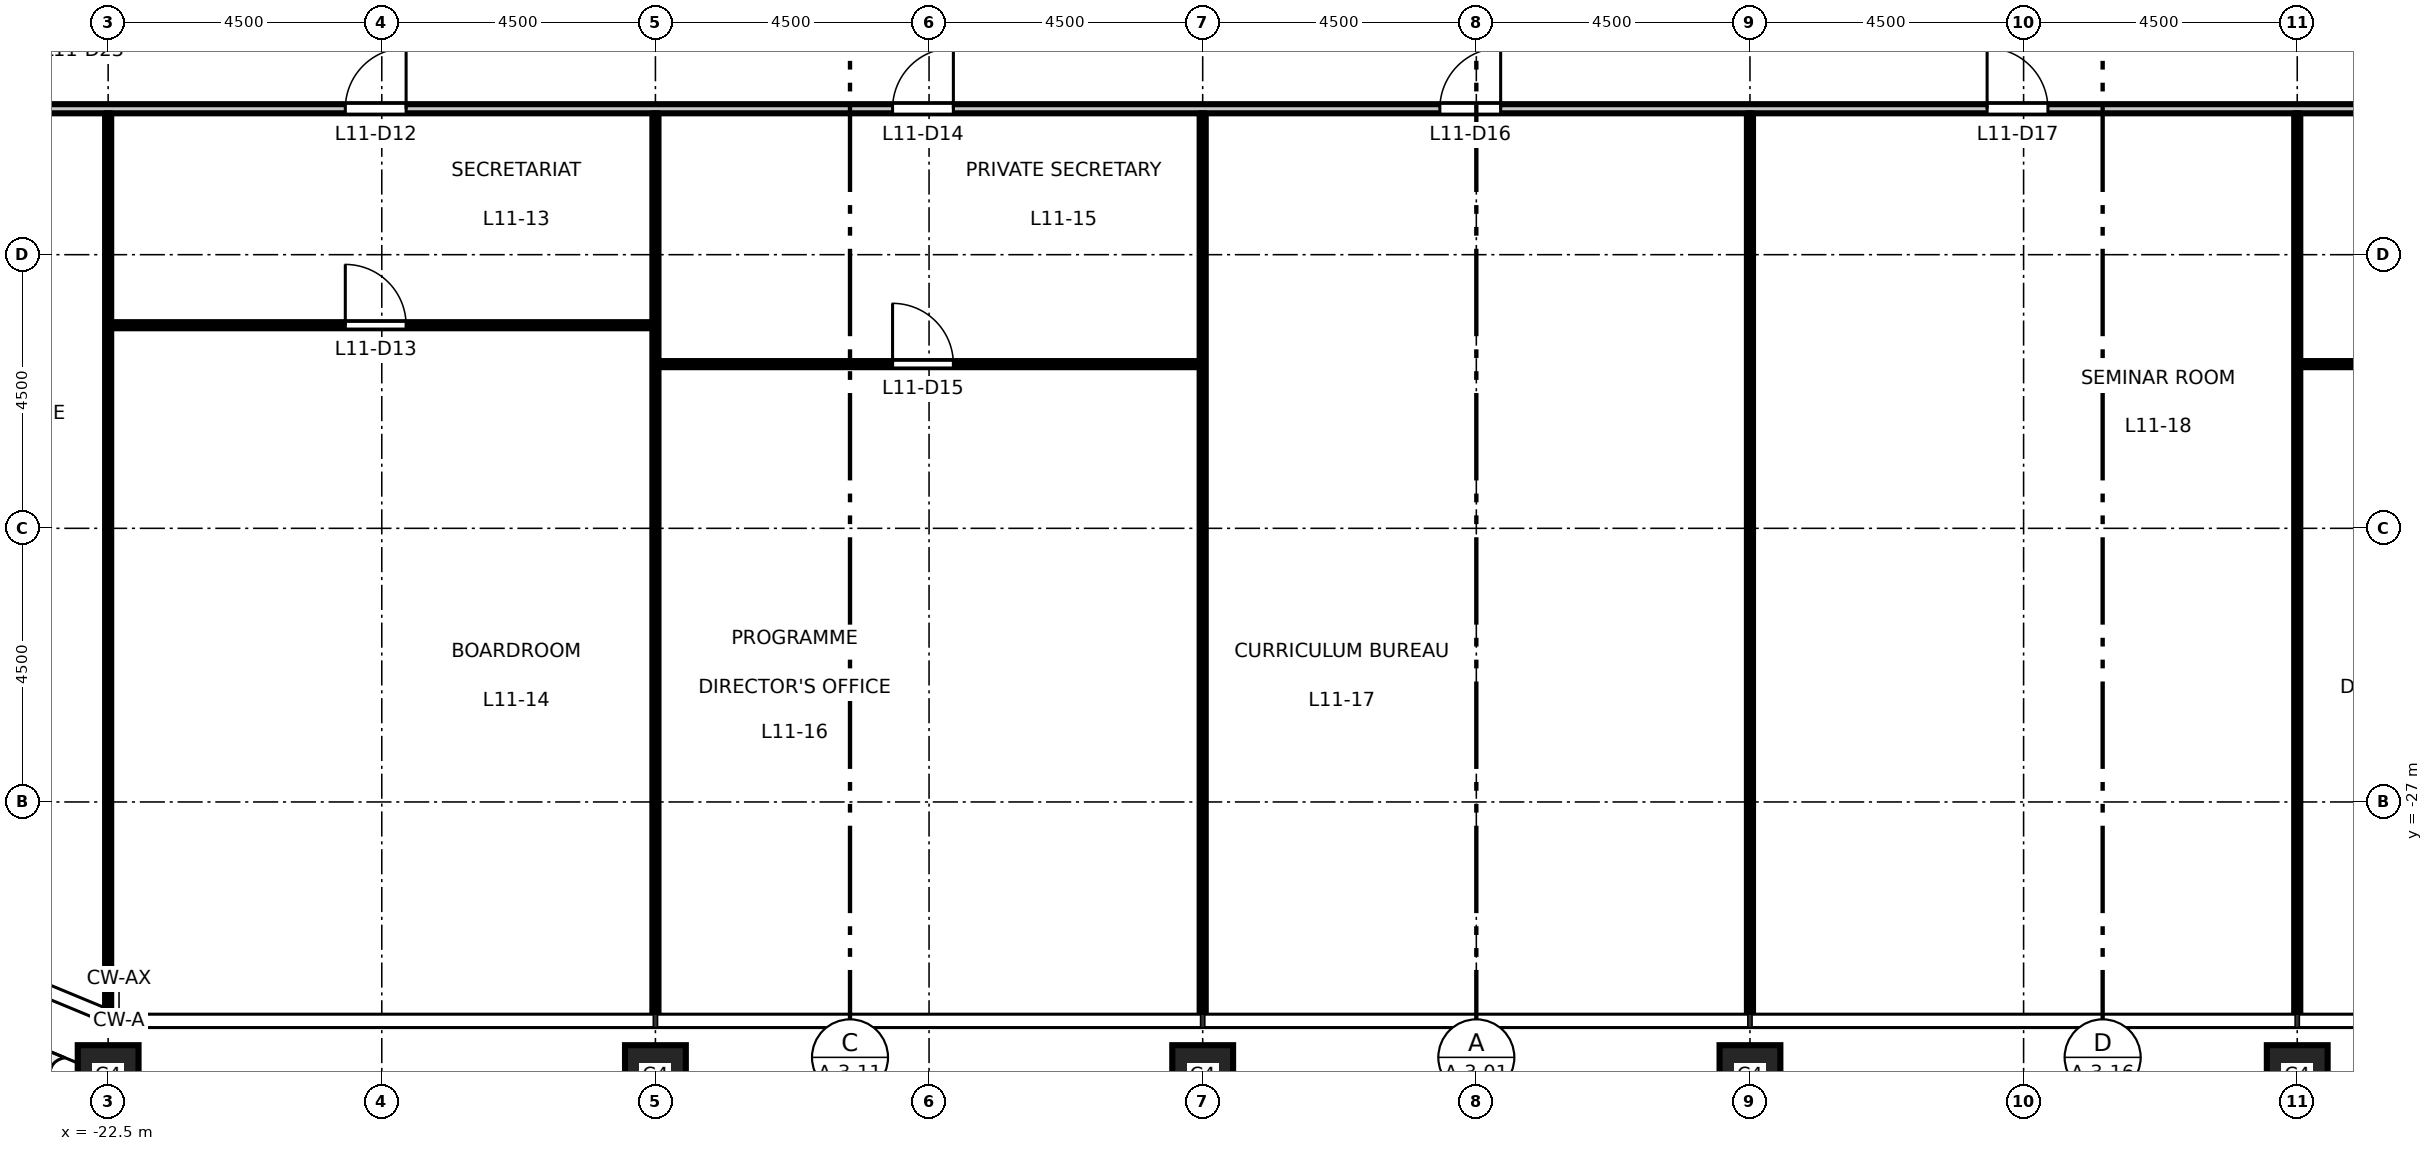
"""IFC4 building model, lengths in metres.
Left out: names, types, materials, properties, quantities, classifications, styles, units other than length and angle.
Written with IfcOpenShell. Run it as: python <this file> out.ifc"""

import sys

from ifc_helpers import new_model, si_unit, direction, frame, frame_2d, origin, origin_2d, place, context, subcontext, project, spatial, rectangle, hollow_rectangle, extrude, element, fill, save


model = new_model("IFC4")
c1 = context("Model", 3, precision=1e-05, world=origin(), true_north=direction((0.0, 1.0)))
c2 = subcontext(c1, "Body", "Model", "MODEL_VIEW")
j1 = project(units=[si_unit("LENGTHUNIT", "METRE"), si_unit("PLANEANGLEUNIT", "RADIAN")], contexts=[c1])
p1 = place(None, origin())
s1 = spatial("IfcSite", under=j1, at=p1, CompositionType="ELEMENT")
p2 = place(p1, origin())
s2 = spatial("IfcBuilding", under=s1, at=p2, CompositionType="ELEMENT")
p3 = place(p2, frame((0.0, 0.0, 53.7)))
s3 = spatial("IfcBuildingStorey", under=s2, at=p3, CompositionType="ELEMENT", Elevation=53.7)
for number, where, z_axis, x_axis in (
    (1, (-22.5, -31.5, 0.0), (0.0, 0.0, 1.0), (1.0, 0.0, 0.0)),
    (2, (-13.5, -31.5, 0.0), (0.0, 0.0, 1.0), (1.0, 0.0, 0.0)),
    (3, (-4.5, -31.5, 0.0), (0.0, 0.0, 1.0), (1.0, 0.0, 0.0)),
    (4, (4.5, -31.5, 0.0), (0.0, 0.0, 1.0), (1.0, 0.0, 0.0)),
    (5, (13.5, -31.5, 0.0), (0.0, 0.0, 1.0), (1.0, 0.0, 0.0)),
):
    element("IfcColumn", number, at=place(p3, frame(where, z_axis=z_axis, x_axis=x_axis)), inside=s3, PredefinedType="COLUMN", context=c2, shape_type="SweptSolid", body=[
        extrude(hollow_rectangle(XDim=1.0, YDim=1.0, WallThickness=0.06, at=origin_2d()), origin(), (0.0, 0.0, 1.0), 4.5),
    ])
p4 = place(p3, frame((-13.45, -19.8, 0.0), z_axis=(0.0, 0.0, 1.0), x_axis=(1.0, 0.0, 0.0)))
e6 = element("IfcWall", 6, at=p4, inside=s3, PredefinedType="PARTITIONING", context=c2, shape_type="SweptSolid", body=[
    extrude(rectangle(XDim=8.9, YDim=0.1, at=frame_2d((4.45, 0.0))), origin(), (0.0, 0.0, 1.0), 4.35),
])
p5 = place(p4, frame((3.85, 0.0, 0.0)))
e7 = element("IfcOpeningElement", 7, at=p5, cuts=e6, PredefinedType="OPENING", context=c2, shape_type="SweptSolid", body=[
    extrude(rectangle(XDim=1.0, YDim=2.1, at=frame_2d((0.5, 1.05))), frame((0.0, 0.06, 0.0), z_axis=(0.0, -1.0, 0.0), x_axis=(1.0, 0.0, 0.0)), (0.0, 0.0, 1.0), 0.12),
])
p6 = place(p3, frame((13.55, -19.8, 0.0), z_axis=(0.0, 0.0, 1.0), x_axis=(1.0, 0.0, 0.0)))
e8 = element("IfcWall", 8, at=p6, inside=s3, PredefinedType="PARTITIONING", context=c2, shape_type="SweptSolid", body=[
    extrude(rectangle(XDim=8.9, YDim=0.1, at=frame_2d((4.45, 0.0))), origin(), (0.0, 0.0, 1.0), 4.35),
])
p7 = place(p6, frame((3.85, 0.0, 0.0)))
e9 = element("IfcOpeningElement", 9, at=p7, cuts=e8, PredefinedType="OPENING", context=c2, shape_type="SweptSolid", body=[
    extrude(rectangle(XDim=1.0, YDim=2.1, at=frame_2d((0.5, 1.05))), frame((0.0, 0.06, 0.0), z_axis=(0.0, -1.0, 0.0), x_axis=(1.0, 0.0, 0.0)), (0.0, 0.0, 1.0), 0.12),
])
p8 = place(p3, frame((-22.45, -19.16, 0.0), z_axis=(0.0, 0.0, 1.0), x_axis=(1.0, 0.0, 0.0)))
e10 = element("IfcWall", 10, at=p8, inside=s3, PredefinedType="PARTITIONING", context=c2, shape_type="SweptSolid", body=[
    extrude(rectangle(XDim=8.9, YDim=0.1, at=frame_2d((4.45, 0.0))), origin(), (0.0, 0.0, 1.0), 4.35),
])
p9 = place(p8, frame((3.85, 0.0, 0.0)))
e11 = element("IfcOpeningElement", 11, at=p9, cuts=e10, PredefinedType="OPENING", context=c2, shape_type="SweptSolid", body=[
    extrude(rectangle(XDim=1.0, YDim=2.1, at=frame_2d((0.5, 1.05))), frame((0.0, 0.06, 0.0), z_axis=(0.0, -1.0, 0.0), x_axis=(1.0, 0.0, 0.0)), (0.0, 0.0, 1.0), 0.12),
])
p10 = place(p3, frame((-23.925, -15.6, 0.0), z_axis=(0.0, 0.0, 1.0), x_axis=(1.0, 0.0, 0.0)))
e12 = element("IfcWall", 12, at=p10, inside=s3, PredefinedType="PARTITIONING", context=c2, shape_type="SweptSolid", body=[
    extrude(rectangle(XDim=47.85, YDim=0.15, at=frame_2d((23.925, 0.0))), origin(), (0.0, 0.0, 1.0), 4.35),
])
p11 = place(p10, frame((5.325, 0.0, 0.0)))
e13 = element("IfcOpeningElement", 13, at=p11, cuts=e12, PredefinedType="OPENING", context=c2, shape_type="SweptSolid", body=[
    extrude(rectangle(XDim=1.0, YDim=2.1, at=frame_2d((0.5, 1.05))), frame((0.0, 0.085, 0.0), z_axis=(0.0, -1.0, 0.0), x_axis=(1.0, 0.0, 0.0)), (0.0, 0.0, 1.0), 0.17),
])
p12 = place(p10, frame((14.325, 0.0, 0.0)))
e14 = element("IfcOpeningElement", 14, at=p12, cuts=e12, PredefinedType="OPENING", context=c2, shape_type="SweptSolid", body=[
    extrude(rectangle(XDim=1.0, YDim=2.1, at=frame_2d((0.5, 1.05))), frame((0.0, 0.085, 0.0), z_axis=(0.0, -1.0, 0.0), x_axis=(1.0, 0.0, 0.0)), (0.0, 0.0, 1.0), 0.17),
])
p13 = place(p10, frame((23.325, 0.0, 0.0)))
e15 = element("IfcOpeningElement", 15, at=p13, cuts=e12, PredefinedType="OPENING", context=c2, shape_type="SweptSolid", body=[
    extrude(rectangle(XDim=1.0, YDim=2.1, at=frame_2d((0.5, 1.05))), frame((0.0, 0.085, 0.0), z_axis=(0.0, -1.0, 0.0), x_axis=(1.0, 0.0, 0.0)), (0.0, 0.0, 1.0), 0.17),
])
p14 = place(p10, frame((32.325, 0.0, 0.0)))
e16 = element("IfcOpeningElement", 16, at=p14, cuts=e12, PredefinedType="OPENING", context=c2, shape_type="SweptSolid", body=[
    extrude(rectangle(XDim=1.0, YDim=2.1, at=frame_2d((0.5, 1.05))), frame((0.0, 0.085, 0.0), z_axis=(0.0, -1.0, 0.0), x_axis=(1.0, 0.0, 0.0)), (0.0, 0.0, 1.0), 0.17),
])
p15 = place(p10, frame((41.325, 0.0, 0.0)))
e17 = element("IfcOpeningElement", 17, at=p15, cuts=e12, PredefinedType="OPENING", context=c2, shape_type="SweptSolid", body=[
    extrude(rectangle(XDim=1.0, YDim=2.1, at=frame_2d((0.5, 1.05))), frame((0.0, 0.085, 0.0), z_axis=(0.0, -1.0, 0.0), x_axis=(1.0, 0.0, 0.0)), (0.0, 0.0, 1.0), 0.17),
])
p16 = place(p3, frame((-22.5, -30.428, 0.0), z_axis=(0.0, 0.0, 1.0), x_axis=(0.0, 1.0, 0.0)))
e18 = element("IfcWall", 18, at=p16, inside=s3, PredefinedType="PARTITIONING", context=c2, shape_type="SweptSolid", body=[
    extrude(rectangle(XDim=14.753, YDim=0.1, at=frame_2d((7.376, 0.0))), origin(), (0.0, 0.0, 1.0), 3.35),
])
for number, where, z_axis, x_axis in (
    (19, (-13.5, -30.51, 0.0), (0.0, 0.0, 1.0), (0.0, 1.0, 0.0)),
    (20, (-4.5, -30.51, 0.0), (0.0, 0.0, 1.0), (0.0, 1.0, 0.0)),
    (21, (4.5, -30.51, 0.0), (0.0, 0.0, 1.0), (0.0, 1.0, 0.0)),
    (22, (13.5, -30.51, 0.0), (0.0, 0.0, 1.0), (0.0, 1.0, 0.0)),
):
    element("IfcWall", number, at=place(p3, frame(where, z_axis=z_axis, x_axis=x_axis)), inside=s3, PredefinedType="PARTITIONING", context=c2, shape_type="SweptSolid", body=[
        extrude(rectangle(XDim=14.835, YDim=0.1, at=frame_2d((7.417, 0.0))), origin(), (0.0, 0.0, 1.0), 3.35),
    ])
p17 = place(p11, origin())
e23 = element("IfcDoor", 23, at=p17, inside=s3, OperationType="SINGLE_SWING_RIGHT", PredefinedType="DOOR", context=c2, shape_type="SweptSolid", body=[
    extrude(rectangle(XDim=1.0, YDim=2.1, at=frame_2d((0.5, 1.05))), frame((0.0, 0.025, 0.0), z_axis=(0.0, -1.0, 0.0), x_axis=(1.0, 0.0, 0.0)), (0.0, 0.0, 1.0), 0.05),
])
fill(e13, e23)
p18 = place(p9, origin())
e24 = element("IfcDoor", 24, at=p18, inside=s3, OperationType="SINGLE_SWING_LEFT", PredefinedType="DOOR", context=c2, shape_type="SweptSolid", body=[
    extrude(rectangle(XDim=1.0, YDim=2.1, at=frame_2d((0.5, 1.05))), frame((0.0, 0.025, 0.0), z_axis=(0.0, -1.0, 0.0), x_axis=(1.0, 0.0, 0.0)), (0.0, 0.0, 1.0), 0.05),
])
fill(e11, e24)
p19 = place(p12, origin())
e25 = element("IfcDoor", 25, at=p19, inside=s3, OperationType="SINGLE_SWING_RIGHT", PredefinedType="DOOR", context=c2, shape_type="SweptSolid", body=[
    extrude(rectangle(XDim=1.0, YDim=2.1, at=frame_2d((0.5, 1.05))), frame((0.0, 0.025, 0.0), z_axis=(0.0, -1.0, 0.0), x_axis=(1.0, 0.0, 0.0)), (0.0, 0.0, 1.0), 0.05),
])
fill(e14, e25)
p20 = place(p5, origin())
e26 = element("IfcDoor", 26, at=p20, inside=s3, OperationType="SINGLE_SWING_LEFT", PredefinedType="DOOR", context=c2, shape_type="SweptSolid", body=[
    extrude(rectangle(XDim=1.0, YDim=2.1, at=frame_2d((0.5, 1.05))), frame((0.0, 0.025, 0.0), z_axis=(0.0, -1.0, 0.0), x_axis=(1.0, 0.0, 0.0)), (0.0, 0.0, 1.0), 0.05),
])
fill(e7, e26)
p21 = place(p13, origin())
e27 = element("IfcDoor", 27, at=p21, inside=s3, OperationType="SINGLE_SWING_RIGHT", PredefinedType="DOOR", context=c2, shape_type="SweptSolid", body=[
    extrude(rectangle(XDim=1.0, YDim=2.1, at=frame_2d((0.5, 1.05))), frame((0.0, 0.025, 0.0), z_axis=(0.0, -1.0, 0.0), x_axis=(1.0, 0.0, 0.0)), (0.0, 0.0, 1.0), 0.05),
])
fill(e15, e27)
p22 = place(p14, origin())
e28 = element("IfcDoor", 28, at=p22, inside=s3, OperationType="SINGLE_SWING_LEFT", PredefinedType="DOOR", context=c2, shape_type="SweptSolid", body=[
    extrude(rectangle(XDim=1.0, YDim=2.1, at=frame_2d((0.5, 1.05))), frame((0.0, 0.025, 0.0), z_axis=(0.0, -1.0, 0.0), x_axis=(1.0, 0.0, 0.0)), (0.0, 0.0, 1.0), 0.05),
])
fill(e16, e28)
save(model, sys.argv[1])
